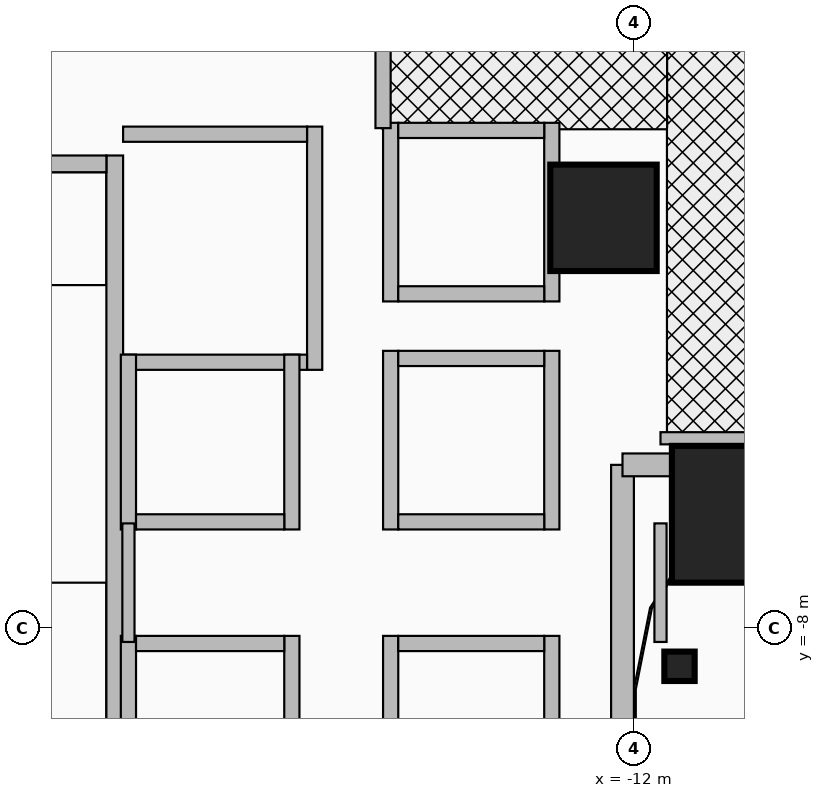
"""IFC4 building model, lengths in metres.
Left out: names, types, materials, properties, quantities, classifications, styles, units other than length and angle.
Written with IfcOpenShell. Run it as: python <this file> out.ifc"""

import sys

from ifc_helpers import new_model, si_unit, direction, frame, frame_2d, origin, origin_2d, place, context, subcontext, project, spatial, rectangle, i_section, extrude, source, transform, mapped, element, fill, save


model = new_model("IFC4")
c1 = context("Model", 3, precision=1e-05, world=origin(), true_north=direction((0.0, 1.0)))
c2 = subcontext(c1, "Body", "Model", "MODEL_VIEW")
j1 = project(units=[si_unit("LENGTHUNIT", "METRE"), si_unit("PLANEANGLEUNIT", "RADIAN")], contexts=[c1])
p1 = place(None, origin())
s1 = spatial("IfcSite", under=j1, at=p1, CompositionType="ELEMENT")
p2 = place(p1, origin())
s2 = spatial("IfcBuilding", under=s1, at=p2, CompositionType="ELEMENT")
p3 = place(p2, origin())
s3 = spatial("IfcBuildingStorey", under=s2, at=p3, CompositionType="ELEMENT", Elevation=0.0)
p4 = place(p3, frame((-18.83, -10.45, 0.0), z_axis=(0.0, 0.0, 1.0), x_axis=(0.0, 1.0, 0.0)))
e1 = element("IfcWall", 1, at=p4, inside=s3, PredefinedType="SHEAR", context=c2, shape_type="SweptSolid", body=[
    extrude(rectangle(XDim=8.67, YDim=0.22, at=frame_2d((4.335, 0.0))), origin(), (0.0, 0.0, 1.0), 4.92),
])
p5 = place(p3, frame((-22.05, -1.89, 0.0), z_axis=(0.0, 0.0, 1.0), x_axis=(1.0, 0.0, 0.0)))
e2 = element("IfcWall", 2, at=p5, inside=s3, PredefinedType="SHEAR", context=c2, shape_type="SweptSolid", body=[
    extrude(rectangle(XDim=3.11, YDim=0.22, at=frame_2d((1.555, 0.0))), origin(), (0.0, 0.0, 1.0), 4.92),
])
p6 = place(p5, frame((1.0, 0.0, 0.0)))
e3 = element("IfcOpeningElement", 3, at=p6, cuts=e2, PredefinedType="OPENING", context=c2, shape_type="SweptSolid", body=[
    extrude(rectangle(XDim=1.1, YDim=2.15, at=frame_2d((0.55, 1.075))), frame((0.0, 0.125, 0.0), z_axis=(0.0, -1.0, 0.0), x_axis=(1.0, 0.0, 0.0)), (0.0, 0.0, 1.0), 0.25),
])
m1 = source(origin(), c2, "Body", "SweptSolid", [
    extrude(rectangle(XDim=1.4, YDim=1.4, at=origin_2d()), origin(), (0.0, 0.0, 1.0), 5.2),
])
p7 = place(p3, frame((-12.4, -2.6, 0.0), z_axis=(0.0, 0.0, 1.0), x_axis=(1.0, 0.0, 0.0)))
e4 = element("IfcColumn", 4, at=p7, inside=s3, PredefinedType="COLUMN", context=c2, shape_type="MappedRepresentation", body=[
    mapped(m1, transform((0.0, 0.0, 0.0), x_axis=(1.0, 0.0, 0.0), y_axis=(0.0, 1.0, 0.0), z_axis=(0.0, 0.0, 1.0), scale=1.0)),
])
m2 = source(origin(), c2, "Body", "SweptSolid", [
    extrude(rectangle(XDim=1.8, YDim=1.8, at=origin_2d()), origin(), (0.0, 0.0, 1.0), 5.2),
])
p8 = place(p3, frame((-10.6, -6.5, 0.0), z_axis=(0.0, 0.0, 1.0), x_axis=(1.0, 0.0, 0.0)))
e5 = element("IfcColumn", 5, at=p8, inside=s3, PredefinedType="COLUMN", context=c2, shape_type="MappedRepresentation", body=[
    mapped(m2, transform((0.0, 0.0, 0.0), x_axis=(1.0, 0.0, 0.0), y_axis=(0.0, 1.0, 0.0), z_axis=(0.0, 0.0, 1.0), scale=1.0)),
])
m3 = source(origin(), c2, "Body", "SweptSolid", [
    extrude(i_section(OverallWidth=0.399, OverallDepth=0.387, WebThickness=0.021, FlangeThickness=0.033, at=origin_2d()), origin(), (0.0, 0.0, 1.0), 3.9),
])
p9 = place(p3, frame((-11.4, -8.5, 0.0), z_axis=(0.0, 0.0, 1.0), x_axis=(1.0, 0.0, 0.0)))
e6 = element("IfcColumn", 6, at=p9, inside=s3, PredefinedType="PILASTER", context=c2, shape_type="MappedRepresentation", body=[
    mapped(m3, transform((0.0, 0.0, 0.0), x_axis=(1.0, 0.0, 0.0), y_axis=(0.0, 1.0, 0.0), z_axis=(0.0, 0.0, 1.0), scale=1.0)),
])
p10 = place(p3, frame((-12.15, -22.85, 0.0), z_axis=(0.0, 0.0, 1.0), x_axis=(0.0, 1.0, 0.0)))
e7 = element("IfcWall", 7, at=p10, inside=s3, PredefinedType="SOLIDWALL", context=c2, shape_type="SweptSolid", body=[
    extrude(rectangle(XDim=17.0, YDim=0.3, at=frame_2d((8.5, 0.0))), origin(), (0.0, 0.0, 1.0), 3.957),
])
p11 = place(p3, frame((-12.15, -5.85, 0.0), z_axis=(0.0, 0.0, 1.0), x_axis=(1.0, 0.0, 0.0)))
e8 = element("IfcWall", 8, at=p11, inside=s3, PredefinedType="SOLIDWALL", context=c2, shape_type="SweptSolid", body=[
    extrude(rectangle(XDim=2.6, YDim=0.3, at=frame_2d((1.3, 0.0))), origin(), (0.0, 0.0, 1.0), 4.92),
])
p12 = place(p3, frame((-16.2, -4.6, 0.0), z_axis=(0.0, 0.0, 1.0), x_axis=(0.0, 1.0, 0.0)))
e9 = element("IfcWall", 9, at=p12, inside=s3, PredefinedType="MOVABLE", context=c2, shape_type="SweptSolid", body=[
    extrude(rectangle(XDim=3.2, YDim=0.2, at=frame_2d((1.6, 0.0))), origin(), (0.0, 0.0, 1.0), 4.92),
])
p13 = place(p3, frame((-18.72, -4.5, 0.0), z_axis=(0.0, 0.0, 1.0), x_axis=(1.0, 0.0, 0.0)))
e10 = element("IfcWall", 10, at=p13, inside=s3, PredefinedType="MOVABLE", context=c2, shape_type="SweptSolid", body=[
    extrude(rectangle(XDim=2.42, YDim=0.2, at=frame_2d((1.21, 0.0))), origin(), (0.0, 0.0, 1.0), 4.92),
])
p14 = place(p3, frame((-18.72, -1.5, 0.0), z_axis=(0.0, 0.0, 1.0), x_axis=(1.0, 0.0, 0.0)))
e11 = element("IfcWall", 11, at=p14, inside=s3, PredefinedType="MOVABLE", context=c2, shape_type="SweptSolid", body=[
    extrude(rectangle(XDim=2.42, YDim=0.2, at=frame_2d((1.21, 0.0))), origin(), (0.0, 0.0, 1.0), 4.92),
])
p15 = place(p14, frame((0.61, 0.0, 0.0)))
e12 = element("IfcOpeningElement", 12, at=p15, cuts=e11, PredefinedType="OPENING", context=c2, shape_type="SweptSolid", body=[
    extrude(rectangle(XDim=1.2, YDim=2.1, at=frame_2d((0.6, 1.05))), frame((0.0, 0.115, 0.0), z_axis=(0.0, -1.0, 0.0), x_axis=(1.0, 0.0, 0.0)), (0.0, 0.0, 1.0), 0.23),
])
for number, where, z_axis, x_axis in (
    (13, (-15.2, -10.45, 0.0), (0.0, 0.0, 1.0), (0.0, 1.0, 0.0)),
    (14, (-13.08, -10.45, 0.0), (0.0, 0.0, 1.0), (0.0, 1.0, 0.0)),
):
    element("IfcWall", number, at=place(p3, frame(where, z_axis=z_axis, x_axis=x_axis)), inside=s3, PredefinedType="MOVABLE", context=c2, shape_type="SweptSolid", body=[
        extrude(rectangle(XDim=2.35, YDim=0.2, at=frame_2d((1.175, 0.0))), origin(), (0.0, 0.0, 1.0), 3.957),
    ])
p16 = place(p3, frame((-15.1, -8.2, 0.0), z_axis=(0.0, 0.0, 1.0), x_axis=(1.0, 0.0, 0.0)))
e15 = element("IfcWall", 15, at=p16, inside=s3, PredefinedType="MOVABLE", context=c2, shape_type="SweptSolid", body=[
    extrude(rectangle(XDim=1.92, YDim=0.2, at=frame_2d((0.96, 0.0))), origin(), (0.0, 0.0, 1.0), 4.92),
])
p17 = place(p16, frame((0.41, 0.0, 0.0)))
e16 = element("IfcOpeningElement", 16, at=p17, cuts=e15, PredefinedType="OPENING", context=c2, shape_type="SweptSolid", body=[
    extrude(rectangle(XDim=1.1, YDim=2.1, at=frame_2d((0.55, 1.05))), frame((0.0, 0.115, 0.0), z_axis=(0.0, -1.0, 0.0), x_axis=(1.0, 0.0, 0.0)), (0.0, 0.0, 1.0), 0.23),
])
for number, where, z_axis, x_axis in (
    (17, (-15.2, -6.7, 0.0), (0.0, 0.0, 1.0), (0.0, 1.0, 0.0)),
    (18, (-13.08, -6.7, 0.0), (0.0, 0.0, 1.0), (0.0, 1.0, 0.0)),
):
    element("IfcWall", number, at=place(p3, frame(where, z_axis=z_axis, x_axis=x_axis)), inside=s3, PredefinedType="MOVABLE", context=c2, shape_type="SweptSolid", body=[
        extrude(rectangle(XDim=2.35, YDim=0.2, at=frame_2d((1.175, 0.0))), origin(), (0.0, 0.0, 1.0), 4.92),
    ])
p18 = place(p3, frame((-15.1, -6.6, 0.0), z_axis=(0.0, 0.0, 1.0), x_axis=(1.0, 0.0, 0.0)))
e19 = element("IfcWall", 19, at=p18, inside=s3, PredefinedType="MOVABLE", context=c2, shape_type="SweptSolid", body=[
    extrude(rectangle(XDim=1.92, YDim=0.2, at=frame_2d((0.96, 0.0))), origin(), (0.0, 0.0, 1.0), 4.92),
])
p19 = place(p18, frame((0.41, 0.0, 0.0)))
e20 = element("IfcOpeningElement", 20, at=p19, cuts=e19, PredefinedType="OPENING", context=c2, shape_type="SweptSolid", body=[
    extrude(rectangle(XDim=1.1, YDim=2.1, at=frame_2d((0.55, 1.05))), frame((0.0, 0.115, 0.0), z_axis=(0.0, -1.0, 0.0), x_axis=(1.0, 0.0, 0.0)), (0.0, 0.0, 1.0), 0.23),
])
p20 = place(p3, frame((-15.1, -4.45, 0.0), z_axis=(0.0, 0.0, 1.0), x_axis=(1.0, 0.0, 0.0)))
e21 = element("IfcWall", 21, at=p20, inside=s3, PredefinedType="MOVABLE", context=c2, shape_type="SweptSolid", body=[
    extrude(rectangle(XDim=1.92, YDim=0.2, at=frame_2d((0.96, 0.0))), origin(), (0.0, 0.0, 1.0), 4.92),
])
for number, where, z_axis, x_axis in (
    (22, (-18.65, -10.45, 0.0), (0.0, 0.0, 1.0), (0.0, 1.0, 0.0)),
    (23, (-16.5, -10.45, 0.0), (0.0, 0.0, 1.0), (0.0, 1.0, 0.0)),
):
    element("IfcWall", number, at=place(p3, frame(where, z_axis=z_axis, x_axis=x_axis)), inside=s3, PredefinedType="MOVABLE", context=c2, shape_type="SweptSolid", body=[
        extrude(rectangle(XDim=2.35, YDim=0.2, at=frame_2d((1.175, 0.0))), origin(), (0.0, 0.0, 1.0), 3.957),
    ])
p21 = place(p3, frame((-18.55, -8.2, 0.0), z_axis=(0.0, 0.0, 1.0), x_axis=(1.0, 0.0, 0.0)))
e24 = element("IfcWall", 24, at=p21, inside=s3, PredefinedType="MOVABLE", context=c2, shape_type="SweptSolid", body=[
    extrude(rectangle(XDim=1.95, YDim=0.2, at=frame_2d((0.975, 0.0))), origin(), (0.0, 0.0, 1.0), 4.92),
])
p22 = place(p21, frame((0.425, 0.0, 0.0)))
e25 = element("IfcOpeningElement", 25, at=p22, cuts=e24, PredefinedType="OPENING", context=c2, shape_type="SweptSolid", body=[
    extrude(rectangle(XDim=1.1, YDim=2.1, at=frame_2d((0.55, 1.05))), frame((0.0, 0.115, 0.0), z_axis=(0.0, -1.0, 0.0), x_axis=(1.0, 0.0, 0.0)), (0.0, 0.0, 1.0), 0.23),
])
for number, where, z_axis, x_axis in (
    (26, (-18.65, -6.7, 0.0), (0.0, 0.0, 1.0), (0.0, 1.0, 0.0)),
    (27, (-16.5, -6.7, 0.0), (0.0, 0.0, 1.0), (0.0, 1.0, 0.0)),
):
    element("IfcWall", number, at=place(p3, frame(where, z_axis=z_axis, x_axis=x_axis)), inside=s3, PredefinedType="MOVABLE", context=c2, shape_type="SweptSolid", body=[
        extrude(rectangle(XDim=2.3, YDim=0.2, at=frame_2d((1.15, 0.0))), origin(), (0.0, 0.0, 1.0), 4.92),
    ])
p23 = place(p3, frame((-18.55, -6.6, 0.0), z_axis=(0.0, 0.0, 1.0), x_axis=(1.0, 0.0, 0.0)))
e28 = element("IfcWall", 28, at=p23, inside=s3, PredefinedType="MOVABLE", context=c2, shape_type="SweptSolid", body=[
    extrude(rectangle(XDim=1.95, YDim=0.2, at=frame_2d((0.975, 0.0))), origin(), (0.0, 0.0, 1.0), 4.92),
])
p24 = place(p23, frame((0.425, 0.0, 0.0)))
e29 = element("IfcOpeningElement", 29, at=p24, cuts=e28, PredefinedType="OPENING", context=c2, shape_type="SweptSolid", body=[
    extrude(rectangle(XDim=1.1, YDim=2.1, at=frame_2d((0.55, 1.05))), frame((0.0, 0.115, 0.0), z_axis=(0.0, -1.0, 0.0), x_axis=(1.0, 0.0, 0.0)), (0.0, 0.0, 1.0), 0.23),
])
for number, where, z_axis, x_axis in (
    (30, (-15.2, -3.7, 0.0), (0.0, 0.0, 1.0), (0.0, 1.0, 0.0)),
    (31, (-13.08, -3.7, 0.0), (0.0, 0.0, 1.0), (0.0, 1.0, 0.0)),
):
    element("IfcWall", number, at=place(p3, frame(where, z_axis=z_axis, x_axis=x_axis)), inside=s3, PredefinedType="MOVABLE", context=c2, shape_type="SweptSolid", body=[
        extrude(rectangle(XDim=2.35, YDim=0.2, at=frame_2d((1.175, 0.0))), origin(), (0.0, 0.0, 1.0), 4.92),
    ])
p25 = place(p3, frame((-15.1, -3.6, 0.0), z_axis=(0.0, 0.0, 1.0), x_axis=(1.0, 0.0, 0.0)))
e32 = element("IfcWall", 32, at=p25, inside=s3, PredefinedType="MOVABLE", context=c2, shape_type="SweptSolid", body=[
    extrude(rectangle(XDim=1.92, YDim=0.2, at=frame_2d((0.96, 0.0))), origin(), (0.0, 0.0, 1.0), 4.92),
])
p26 = place(p3, frame((-15.1, -1.45, 0.0), z_axis=(0.0, 0.0, 1.0), x_axis=(1.0, 0.0, 0.0)))
e33 = element("IfcWall", 33, at=p26, inside=s3, PredefinedType="MOVABLE", context=c2, shape_type="SweptSolid", body=[
    extrude(rectangle(XDim=1.92, YDim=0.2, at=frame_2d((0.96, 0.0))), origin(), (0.0, 0.0, 1.0), 4.92),
])
p27 = place(p26, frame((0.41, 0.0, 0.0)))
e34 = element("IfcOpeningElement", 34, at=p27, cuts=e33, PredefinedType="OPENING", context=c2, shape_type="SweptSolid", body=[
    extrude(rectangle(XDim=1.1, YDim=2.1, at=frame_2d((0.55, 1.05))), frame((0.0, 0.115, 0.0), z_axis=(0.0, -1.0, 0.0), x_axis=(1.0, 0.0, 0.0)), (0.0, 0.0, 1.0), 0.23),
])
p28 = place(p3, frame((-15.3, -1.42, 0.0), z_axis=(0.0, 0.0, 1.0), x_axis=(0.0, 1.0, 0.0)))
e35 = element("IfcWall", 35, at=p28, inside=s3, PredefinedType="PARTITIONING", context=c2, shape_type="SweptSolid", body=[
    extrude(rectangle(XDim=2.67, YDim=0.2, at=frame_2d((1.335, 0.0))), origin(), (0.0, 0.0, 1.0), 4.92),
])
p29 = place(p28, frame((0.78, 0.0, 0.0)))
e36 = element("IfcOpeningElement", 36, at=p29, cuts=e35, PredefinedType="OPENING", context=c2, shape_type="SweptSolid", body=[
    extrude(rectangle(XDim=1.05, YDim=2.15, at=frame_2d((0.525, 1.075))), frame((0.0, 0.115, 0.0), z_axis=(0.0, -1.0, 0.0), x_axis=(1.0, 0.0, 0.0)), (0.0, 0.0, 1.0), 0.23),
])
p30 = place(p3, frame((-18.65, -8.18, 0.0), z_axis=(0.0, 0.0, 1.0), x_axis=(0.0, 1.0, 0.0)))
e37 = element("IfcWall", 37, at=p30, inside=s3, PredefinedType="PARTITIONING", context=c2, shape_type="SweptSolid", body=[
    extrude(rectangle(XDim=1.56, YDim=0.16, at=frame_2d((0.78, 0.0))), origin(), (0.0, 0.0, 1.0), 4.92),
])
p31 = place(p3, frame((-11.65, -8.18, 0.0), z_axis=(0.0, 0.0, 1.0), x_axis=(0.0, 1.0, 0.0)))
e38 = element("IfcWall", 38, at=p31, inside=s3, PredefinedType="PARTITIONING", context=c2, shape_type="SweptSolid", body=[
    extrude(rectangle(XDim=1.56, YDim=0.16, at=frame_2d((0.78, 0.0))), origin(), (0.0, 0.0, 1.0), 3.957),
])
p32 = place(p3, frame((-11.65, -5.5, 0.0), z_axis=(0.0, 0.0, 1.0), x_axis=(1.0, 0.0, 0.0)))
e39 = element("IfcWall", 39, at=p32, inside=s3, PredefinedType="PARTITIONING", context=c2, shape_type="SweptSolid", body=[
    extrude(rectangle(XDim=2.1, YDim=0.16, at=frame_2d((1.05, 0.0))), origin(), (0.0, 0.0, 1.0), 4.92),
])
p33 = place(p15, origin())
e40 = element("IfcDoor", 40, at=p33, inside=s3, OperationType="DOUBLE_DOOR_SLIDING", PredefinedType="DOOR", context=c2, shape_type="SweptSolid", body=[
    extrude(rectangle(XDim=1.2, YDim=2.1, at=frame_2d((0.6, 1.05))), frame((0.0, 0.025, 0.0), z_axis=(0.0, -1.0, 0.0), x_axis=(1.0, 0.0, 0.0)), (0.0, 0.0, 1.0), 0.05),
])
fill(e12, e40)
p34 = place(p17, origin())
e41 = element("IfcDoor", 41, at=p34, inside=s3, OperationType="DOUBLE_DOOR_SLIDING", PredefinedType="DOOR", context=c2, shape_type="SweptSolid", body=[
    extrude(rectangle(XDim=1.1, YDim=2.1, at=frame_2d((0.55, 1.05))), frame((0.0, 0.025, 0.0), z_axis=(0.0, -1.0, 0.0), x_axis=(1.0, 0.0, 0.0)), (0.0, 0.0, 1.0), 0.05),
])
fill(e16, e41)
p35 = place(p19, origin())
e42 = element("IfcDoor", 42, at=p35, inside=s3, OperationType="DOUBLE_DOOR_SLIDING", PredefinedType="DOOR", context=c2, shape_type="SweptSolid", body=[
    extrude(rectangle(XDim=1.1, YDim=2.1, at=frame_2d((0.55, 1.05))), frame((0.0, 0.025, 0.0), z_axis=(0.0, -1.0, 0.0), x_axis=(1.0, 0.0, 0.0)), (0.0, 0.0, 1.0), 0.05),
])
fill(e20, e42)
p36 = place(p22, origin())
e43 = element("IfcDoor", 43, at=p36, inside=s3, OperationType="DOUBLE_DOOR_SLIDING", PredefinedType="DOOR", context=c2, shape_type="SweptSolid", body=[
    extrude(rectangle(XDim=1.1, YDim=2.1, at=frame_2d((0.55, 1.05))), frame((0.0, 0.025, 0.0), z_axis=(0.0, -1.0, 0.0), x_axis=(1.0, 0.0, 0.0)), (0.0, 0.0, 1.0), 0.05),
])
fill(e25, e43)
p37 = place(p24, origin())
e44 = element("IfcDoor", 44, at=p37, inside=s3, OperationType="DOUBLE_DOOR_SLIDING", PredefinedType="DOOR", context=c2, shape_type="SweptSolid", body=[
    extrude(rectangle(XDim=1.1, YDim=2.1, at=frame_2d((0.55, 1.05))), frame((0.0, 0.025, 0.0), z_axis=(0.0, -1.0, 0.0), x_axis=(1.0, 0.0, 0.0)), (0.0, 0.0, 1.0), 0.05),
])
fill(e29, e44)
p38 = place(p27, origin())
e45 = element("IfcDoor", 45, at=p38, inside=s3, OperationType="DOUBLE_DOOR_SLIDING", PredefinedType="DOOR", context=c2, shape_type="SweptSolid", body=[
    extrude(rectangle(XDim=1.1, YDim=2.1, at=frame_2d((0.55, 1.05))), frame((0.0, 0.025, 0.0), z_axis=(0.0, -1.0, 0.0), x_axis=(1.0, 0.0, 0.0)), (0.0, 0.0, 1.0), 0.05),
])
fill(e34, e45)
p39 = place(p29, origin())
e46 = element("IfcDoor", 46, at=p39, inside=s3, OperationType="SINGLE_SWING_RIGHT", PredefinedType="DOOR", context=c2, shape_type="SweptSolid", body=[
    extrude(rectangle(XDim=1.05, YDim=2.15, at=frame_2d((0.525, 1.075))), frame((0.0, 0.025, 0.0), z_axis=(0.0, -1.0, 0.0), x_axis=(1.0, 0.0, 0.0)), (0.0, 0.0, 1.0), 0.05),
])
fill(e36, e46)
save(model, sys.argv[1])
